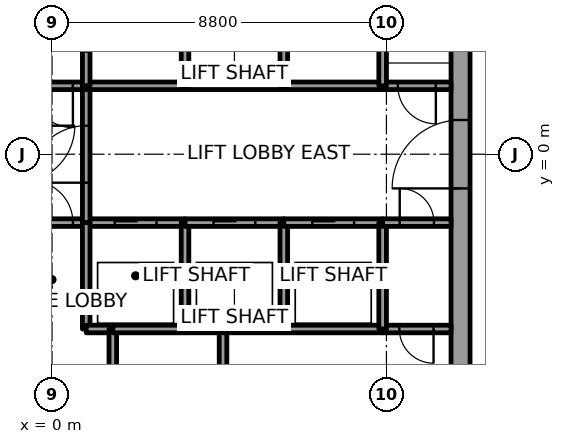
"""IFC4 building model, lengths in metres.
Left out: names, types, materials, properties, quantities, classifications, styles, units other than length and angle.
Written with IfcOpenShell. Run it as: python <this file> out.ifc"""

import sys

from ifc_helpers import new_model, si_unit, direction, frame, frame_2d, origin, place, context, subcontext, project, spatial, rectangle, extrude, element, fill, save


model = new_model("IFC4")
c1 = context("Model", 3, precision=1e-05, world=origin(), true_north=direction((0.0, 1.0)))
c2 = subcontext(c1, "Body", "Model", "MODEL_VIEW")
j1 = project(units=[si_unit("LENGTHUNIT", "METRE"), si_unit("PLANEANGLEUNIT", "RADIAN")], contexts=[c1])
p1 = place(None, origin())
s1 = spatial("IfcSite", under=j1, at=p1, CompositionType="ELEMENT")
p2 = place(p1, origin())
s2 = spatial("IfcBuilding", under=s1, at=p2, CompositionType="ELEMENT")
p3 = place(p2, frame((0.0, 0.0, 193.8)))
s3 = spatial("IfcBuildingStorey", under=s2, at=p3, CompositionType="ELEMENT", Elevation=193.8)
p4 = place(p3, frame((10.75, -7.5, 0.0), z_axis=(0.0, 0.0, 1.0), x_axis=(0.0, 1.0, 0.0)))
e1 = element("IfcWall", 1, at=p4, inside=s3, PredefinedType="SHEAR", context=c2, shape_type="SweptSolid", body=[
    extrude(rectangle(XDim=15.0, YDim=0.5, at=frame_2d((7.5, 0.0))), origin(), (0.0, 0.0, 1.0), 4.0),
])
p5 = place(p4, frame((6.6, 0.0, 0.0)))
e2 = element("IfcOpeningElement", 2, at=p5, cuts=e1, PredefinedType="OPENING", context=c2, shape_type="SweptSolid", body=[
    extrude(rectangle(XDim=1.8, YDim=2.1, at=frame_2d((0.9, 1.05))), frame((0.0, 0.25, 0.0), z_axis=(0.0, -1.0, 0.0), x_axis=(1.0, 0.0, 0.0)), (0.0, 0.0, 1.0), 0.5),
])
p6 = place(p3, frame((-0.9, -1.8, 0.0), z_axis=(0.0, 0.0, 1.0), x_axis=(1.0, 0.0, 0.0)))
e3 = element("IfcWall", 3, at=p6, inside=s3, PredefinedType="SOLIDWALL", context=c2, shape_type="SweptSolid", body=[
    extrude(rectangle(XDim=1.8, YDim=0.2, at=frame_2d((0.9, 0.0))), origin(), (0.0, 0.0, 1.0), 3.85),
])
p7 = place(p6, frame((0.35, 0.0, 0.0)))
e4 = element("IfcOpeningElement", 4, at=p7, cuts=e3, PredefinedType="OPENING", context=c2, shape_type="SweptSolid", body=[
    extrude(rectangle(XDim=1.1, YDim=2.1, at=frame_2d((0.55, 1.05))), frame((0.0, 0.1, 0.0), z_axis=(0.0, -1.0, 0.0), x_axis=(1.0, 0.0, 0.0)), (0.0, 0.0, 1.0), 0.2),
])
p8 = place(p3, frame((0.9, 1.8, 0.0), z_axis=(0.0, 0.0, 1.0), x_axis=(-1.0, 0.0, 0.0)))
e5 = element("IfcWall", 5, at=p8, inside=s3, PredefinedType="SOLIDWALL", context=c2, shape_type="SweptSolid", body=[
    extrude(rectangle(XDim=1.8, YDim=0.2, at=frame_2d((0.9, 0.0))), origin(), (0.0, 0.0, 1.0), 3.85),
])
p9 = place(p8, frame((0.35, 0.0, 0.0)))
e6 = element("IfcOpeningElement", 6, at=p9, cuts=e5, PredefinedType="OPENING", context=c2, shape_type="SweptSolid", body=[
    extrude(rectangle(XDim=1.1, YDim=2.1, at=frame_2d((0.55, 1.05))), frame((0.0, 0.1, 0.0), z_axis=(0.0, -1.0, 0.0), x_axis=(1.0, 0.0, 0.0)), (0.0, 0.0, 1.0), 0.2),
])
p10 = place(p3, frame((0.9, -1.8, 0.0), z_axis=(0.0, 0.0, 1.0), x_axis=(1.0, 0.0, 0.0)))
e7 = element("IfcWall", 7, at=p10, inside=s3, PredefinedType="SOLIDWALL", context=c2, shape_type="SweptSolid", body=[
    extrude(rectangle(XDim=2.6, YDim=0.2, at=frame_2d((1.3, 0.0))), origin(), (0.0, 0.0, 1.0), 3.85),
])
p11 = place(p10, frame((0.75, 0.0, 0.0)))
e8 = element("IfcOpeningElement", 8, at=p11, cuts=e7, PredefinedType="OPENING", context=c2, shape_type="SweptSolid", body=[
    extrude(rectangle(XDim=1.1, YDim=2.1, at=frame_2d((0.55, 1.05))), frame((0.0, 0.1, 0.0), z_axis=(0.0, -1.0, 0.0), x_axis=(1.0, 0.0, 0.0)), (0.0, 0.0, 1.0), 0.2),
])
p12 = place(p3, frame((0.9, -1.8, 0.0), z_axis=(0.0, 0.0, 1.0), x_axis=(0.0, 1.0, 0.0)))
e9 = element("IfcWall", 9, at=p12, inside=s3, PredefinedType="SOLIDWALL", context=c2, shape_type="SweptSolid", body=[
    extrude(rectangle(XDim=3.6, YDim=0.2, at=frame_2d((1.8, 0.0))), origin(), (0.0, 0.0, 1.0), 3.85),
])
p13 = place(p12, frame((1.05, 0.0, 0.0)))
e10 = element("IfcOpeningElement", 10, at=p13, cuts=e9, PredefinedType="OPENING", context=c2, shape_type="SweptSolid", body=[
    extrude(rectangle(XDim=1.5, YDim=2.1, at=frame_2d((0.75, 1.05))), frame((0.0, 0.1, 0.0), z_axis=(0.0, -1.0, 0.0), x_axis=(1.0, 0.0, 0.0)), (0.0, 0.0, 1.0), 0.2),
])
p14 = place(p3, frame((0.9, -1.8, 0.0), z_axis=(0.0, 0.0, 1.0), x_axis=(0.0, -1.0, 0.0)))
e11 = element("IfcWall", 11, at=p14, inside=s3, PredefinedType="SOLIDWALL", context=c2, shape_type="SweptSolid", body=[
    extrude(rectangle(XDim=2.8, YDim=0.2, at=frame_2d((1.4, 0.0))), origin(), (0.0, 0.0, 1.0), 3.85),
])
p15 = place(p3, frame((0.9, -4.6, 0.0), z_axis=(0.0, 0.0, 1.0), x_axis=(1.0, 0.0, 0.0)))
e12 = element("IfcWall", 12, at=p15, inside=s3, PredefinedType="SOLIDWALL", context=c2, shape_type="SweptSolid", body=[
    extrude(rectangle(XDim=0.7, YDim=0.2, at=frame_2d((0.35, 0.0))), origin(), (0.0, 0.0, 1.0), 3.85),
])
p16 = place(p3, frame((3.5, 1.8, 0.0), z_axis=(0.0, 0.0, 1.0), x_axis=(-1.0, 0.0, 0.0)))
e13 = element("IfcWall", 13, at=p16, inside=s3, PredefinedType="SOLIDWALL", context=c2, shape_type="SweptSolid", body=[
    extrude(rectangle(XDim=2.6, YDim=0.2, at=frame_2d((1.3, 0.0))), origin(), (0.0, 0.0, 1.0), 3.85),
])
p17 = place(p3, frame((0.9, 4.8, 0.0), z_axis=(0.0, 0.0, 1.0), x_axis=(0.0, -1.0, 0.0)))
e14 = element("IfcWall", 14, at=p17, inside=s3, PredefinedType="SOLIDWALL", context=c2, shape_type="SweptSolid", body=[
    extrude(rectangle(XDim=3.0, YDim=0.2, at=frame_2d((1.5, 0.0))), origin(), (0.0, 0.0, 1.0), 3.85),
])
p18 = place(p17, frame((0.9, 0.0, 0.0)))
e15 = element("IfcOpeningElement", 15, at=p18, cuts=e14, PredefinedType="OPENING", context=c2, shape_type="SweptSolid", body=[
    extrude(rectangle(XDim=1.2, YDim=2.1, at=frame_2d((0.6, 1.05))), frame((0.0, 0.1, 0.0), z_axis=(0.0, -1.0, 0.0), x_axis=(1.0, 0.0, 0.0)), (0.0, 0.0, 1.0), 0.2),
])
p19 = place(p3, frame((1.6, -4.6, 0.0), z_axis=(0.0, 0.0, 1.0), x_axis=(0.0, -1.0, 0.0)))
e16 = element("IfcWall", 16, at=p19, inside=s3, PredefinedType="SOLIDWALL", context=c2, shape_type="SweptSolid", body=[
    extrude(rectangle(XDim=2.9, YDim=0.2, at=frame_2d((1.45, 0.0))), origin(), (0.0, 0.0, 1.0), 3.85),
])
p20 = place(p19, frame((1.0, 0.0, 0.0)))
e17 = element("IfcOpeningElement", 17, at=p20, cuts=e16, PredefinedType="OPENING", context=c2, shape_type="SweptSolid", body=[
    extrude(rectangle(XDim=0.9, YDim=2.1, at=frame_2d((0.45, 1.05))), frame((0.0, 0.1, 0.0), z_axis=(0.0, -1.0, 0.0), x_axis=(1.0, 0.0, 0.0)), (0.0, 0.0, 1.0), 0.2),
])
p21 = place(p3, frame((3.5, -4.6, 0.0), z_axis=(0.0, 0.0, 1.0), x_axis=(-1.0, 0.0, 0.0)))
e18 = element("IfcWall", 18, at=p21, inside=s3, PredefinedType="SOLIDWALL", context=c2, shape_type="SweptSolid", body=[
    extrude(rectangle(XDim=1.9, YDim=0.2, at=frame_2d((0.95, 0.0))), origin(), (0.0, 0.0, 1.0), 3.85),
])
p22 = place(p3, frame((4.5, -4.6, 0.0), z_axis=(0.0, 0.0, 1.0), x_axis=(-1.0, 0.0, 0.0)))
e19 = element("IfcWall", 19, at=p22, inside=s3, PredefinedType="SOLIDWALL", context=c2, shape_type="SweptSolid", body=[
    extrude(rectangle(XDim=1.0, YDim=0.2, at=frame_2d((0.5, 0.0))), origin(), (0.0, 0.0, 1.0), 3.85),
])
p23 = place(p3, frame((3.5, -4.6, 0.0), z_axis=(0.0, 0.0, 1.0), x_axis=(0.0, 1.0, 0.0)))
e20 = element("IfcWall", 20, at=p23, inside=s3, PredefinedType="SOLIDWALL", context=c2, shape_type="SweptSolid", body=[
    extrude(rectangle(XDim=2.8, YDim=0.2, at=frame_2d((1.4, 0.0))), origin(), (0.0, 0.0, 1.0), 3.85),
])
p24 = place(p3, frame((3.5, -1.8, 0.0), z_axis=(0.0, 0.0, 1.0), x_axis=(1.0, 0.0, 0.0)))
e21 = element("IfcWall", 21, at=p24, inside=s3, PredefinedType="SOLIDWALL", context=c2, shape_type="SweptSolid", body=[
    extrude(rectangle(XDim=2.6, YDim=0.2, at=frame_2d((1.3, 0.0))), origin(), (0.0, 0.0, 1.0), 3.85),
])
p25 = place(p24, frame((0.75, 0.0, 0.0)))
e22 = element("IfcOpeningElement", 22, at=p25, cuts=e21, PredefinedType="OPENING", context=c2, shape_type="SweptSolid", body=[
    extrude(rectangle(XDim=1.1, YDim=2.1, at=frame_2d((0.55, 1.05))), frame((0.0, 0.1, 0.0), z_axis=(0.0, -1.0, 0.0), x_axis=(1.0, 0.0, 0.0)), (0.0, 0.0, 1.0), 0.2),
])
p26 = place(p3, frame((6.1, 1.8, 0.0), z_axis=(0.0, 0.0, 1.0), x_axis=(-1.0, 0.0, 0.0)))
e23 = element("IfcWall", 23, at=p26, inside=s3, PredefinedType="SOLIDWALL", context=c2, shape_type="SweptSolid", body=[
    extrude(rectangle(XDim=2.6, YDim=0.2, at=frame_2d((1.3, 0.0))), origin(), (0.0, 0.0, 1.0), 3.85),
])
p27 = place(p3, frame((3.5, 1.8, 0.0), z_axis=(0.0, 0.0, 1.0), x_axis=(0.0, 1.0, 0.0)))
e24 = element("IfcWall", 24, at=p27, inside=s3, PredefinedType="SOLIDWALL", context=c2, shape_type="SweptSolid", body=[
    extrude(rectangle(XDim=2.8, YDim=0.2, at=frame_2d((1.4, 0.0))), origin(), (0.0, 0.0, 1.0), 3.85),
])
p28 = place(p3, frame((4.5, -4.6, 0.0), z_axis=(0.0, 0.0, 1.0), x_axis=(0.0, -1.0, 0.0)))
e25 = element("IfcWall", 25, at=p28, inside=s3, PredefinedType="SOLIDWALL", context=c2, shape_type="SweptSolid", body=[
    extrude(rectangle(XDim=2.9, YDim=0.2, at=frame_2d((1.45, 0.0))), origin(), (0.0, 0.0, 1.0), 3.85),
])
p29 = place(p3, frame((6.1, -4.6, 0.0), z_axis=(0.0, 0.0, 1.0), x_axis=(-1.0, 0.0, 0.0)))
e26 = element("IfcWall", 26, at=p29, inside=s3, PredefinedType="SOLIDWALL", context=c2, shape_type="SweptSolid", body=[
    extrude(rectangle(XDim=1.6, YDim=0.2, at=frame_2d((0.8, 0.0))), origin(), (0.0, 0.0, 1.0), 3.85),
])
p30 = place(p3, frame((8.7, -4.6, 0.0), z_axis=(0.0, 0.0, 1.0), x_axis=(-1.0, 0.0, 0.0)))
e27 = element("IfcWall", 27, at=p30, inside=s3, PredefinedType="SOLIDWALL", context=c2, shape_type="SweptSolid", body=[
    extrude(rectangle(XDim=2.6, YDim=0.2, at=frame_2d((1.3, 0.0))), origin(), (0.0, 0.0, 1.0), 3.85),
])
p31 = place(p3, frame((6.1, -4.6, 0.0), z_axis=(0.0, 0.0, 1.0), x_axis=(0.0, 1.0, 0.0)))
e28 = element("IfcWall", 28, at=p31, inside=s3, PredefinedType="SOLIDWALL", context=c2, shape_type="SweptSolid", body=[
    extrude(rectangle(XDim=2.8, YDim=0.2, at=frame_2d((1.4, 0.0))), origin(), (0.0, 0.0, 1.0), 3.85),
])
p32 = place(p3, frame((6.1, -1.8, 0.0), z_axis=(0.0, 0.0, 1.0), x_axis=(1.0, 0.0, 0.0)))
e29 = element("IfcWall", 29, at=p32, inside=s3, PredefinedType="SOLIDWALL", context=c2, shape_type="SweptSolid", body=[
    extrude(rectangle(XDim=2.6, YDim=0.2, at=frame_2d((1.3, 0.0))), origin(), (0.0, 0.0, 1.0), 3.85),
])
p33 = place(p32, frame((0.75, 0.0, 0.0)))
e30 = element("IfcOpeningElement", 30, at=p33, cuts=e29, PredefinedType="OPENING", context=c2, shape_type="SweptSolid", body=[
    extrude(rectangle(XDim=1.1, YDim=2.1, at=frame_2d((0.55, 1.05))), frame((0.0, 0.1, 0.0), z_axis=(0.0, -1.0, 0.0), x_axis=(1.0, 0.0, 0.0)), (0.0, 0.0, 1.0), 0.2),
])
p34 = place(p3, frame((8.7, 1.8, 0.0), z_axis=(0.0, 0.0, 1.0), x_axis=(-1.0, 0.0, 0.0)))
e31 = element("IfcWall", 31, at=p34, inside=s3, PredefinedType="SOLIDWALL", context=c2, shape_type="SweptSolid", body=[
    extrude(rectangle(XDim=2.6, YDim=0.2, at=frame_2d((1.3, 0.0))), origin(), (0.0, 0.0, 1.0), 3.85),
])
p35 = place(p3, frame((6.1, 1.8, 0.0), z_axis=(0.0, 0.0, 1.0), x_axis=(0.0, 1.0, 0.0)))
e32 = element("IfcWall", 32, at=p35, inside=s3, PredefinedType="SOLIDWALL", context=c2, shape_type="SweptSolid", body=[
    extrude(rectangle(XDim=2.8, YDim=0.2, at=frame_2d((1.4, 0.0))), origin(), (0.0, 0.0, 1.0), 3.85),
])
p36 = place(p3, frame((10.5, -4.6, 0.0), z_axis=(0.0, 0.0, 1.0), x_axis=(-1.0, 0.0, 0.0)))
e33 = element("IfcWall", 33, at=p36, inside=s3, PredefinedType="SOLIDWALL", context=c2, shape_type="SweptSolid", body=[
    extrude(rectangle(XDim=1.8, YDim=0.2, at=frame_2d((0.9, 0.0))), origin(), (0.0, 0.0, 1.0), 3.85),
])
p37 = place(p36, frame((0.46, 0.0, 0.0)))
e34 = element("IfcOpeningElement", 34, at=p37, cuts=e33, PredefinedType="OPENING", context=c2, shape_type="SweptSolid", body=[
    extrude(rectangle(XDim=0.9, YDim=2.1, at=frame_2d((0.45, 1.05))), frame((0.0, 0.1, 0.0), z_axis=(0.0, -1.0, 0.0), x_axis=(1.0, 0.0, 0.0)), (0.0, 0.0, 1.0), 0.2),
])
p38 = place(p3, frame((8.7, -1.8, 0.0), z_axis=(0.0, 0.0, 1.0), x_axis=(0.0, -1.0, 0.0)))
e35 = element("IfcWall", 35, at=p38, inside=s3, PredefinedType="SOLIDWALL", context=c2, shape_type="SweptSolid", body=[
    extrude(rectangle(XDim=2.8, YDim=0.2, at=frame_2d((1.4, 0.0))), origin(), (0.0, 0.0, 1.0), 3.85),
])
p39 = place(p3, frame((8.7, -1.8, 0.0), z_axis=(0.0, 0.0, 1.0), x_axis=(1.0, 0.0, 0.0)))
e36 = element("IfcWall", 36, at=p39, inside=s3, PredefinedType="SOLIDWALL", context=c2, shape_type="SweptSolid", body=[
    extrude(rectangle(XDim=1.8, YDim=0.2, at=frame_2d((0.9, 0.0))), origin(), (0.0, 0.0, 1.0), 3.85),
])
p40 = place(p39, frame((0.45, 0.0, 0.0)))
e37 = element("IfcOpeningElement", 37, at=p40, cuts=e36, PredefinedType="OPENING", context=c2, shape_type="SweptSolid", body=[
    extrude(rectangle(XDim=0.9, YDim=2.1, at=frame_2d((0.45, 1.05))), frame((0.0, 0.1, 0.0), z_axis=(0.0, -1.0, 0.0), x_axis=(1.0, 0.0, 0.0)), (0.0, 0.0, 1.0), 0.2),
])
p41 = place(p3, frame((10.5, 1.8, 0.0), z_axis=(0.0, 0.0, 1.0), x_axis=(-1.0, 0.0, 0.0)))
e38 = element("IfcWall", 38, at=p41, inside=s3, PredefinedType="SOLIDWALL", context=c2, shape_type="SweptSolid", body=[
    extrude(rectangle(XDim=1.8, YDim=0.2, at=frame_2d((0.9, 0.0))), origin(), (0.0, 0.0, 1.0), 3.85),
])
p42 = place(p41, frame((0.4, 0.0, 0.0)))
e39 = element("IfcOpeningElement", 39, at=p42, cuts=e38, PredefinedType="OPENING", context=c2, shape_type="SweptSolid", body=[
    extrude(rectangle(XDim=1.0, YDim=2.1, at=frame_2d((0.5, 1.05))), frame((0.0, 0.1, 0.0), z_axis=(0.0, -1.0, 0.0), x_axis=(1.0, 0.0, 0.0)), (0.0, 0.0, 1.0), 0.2),
])
p43 = place(p3, frame((8.7, 4.6, 0.0), z_axis=(0.0, 0.0, 1.0), x_axis=(0.0, -1.0, 0.0)))
e40 = element("IfcWall", 40, at=p43, inside=s3, PredefinedType="SOLIDWALL", context=c2, shape_type="SweptSolid", body=[
    extrude(rectangle(XDim=2.8, YDim=0.2, at=frame_2d((1.4, 0.0))), origin(), (0.0, 0.0, 1.0), 3.85),
])
p44 = place(p11, origin())
e41 = element("IfcDoor", 41, at=p44, inside=s3, OperationType="SLIDING_TO_RIGHT", PredefinedType="DOOR", context=c2, shape_type="SweptSolid", body=[
    extrude(rectangle(XDim=1.1, YDim=2.1, at=frame_2d((0.55, 1.05))), frame((0.0, 0.025, 0.0), z_axis=(0.0, -1.0, 0.0), x_axis=(1.0, 0.0, 0.0)), (0.0, 0.0, 1.0), 0.05),
])
fill(e8, e41)
p45 = place(p25, origin())
e42 = element("IfcDoor", 42, at=p45, inside=s3, OperationType="SLIDING_TO_RIGHT", PredefinedType="DOOR", context=c2, shape_type="SweptSolid", body=[
    extrude(rectangle(XDim=1.1, YDim=2.1, at=frame_2d((0.55, 1.05))), frame((0.0, 0.025, 0.0), z_axis=(0.0, -1.0, 0.0), x_axis=(1.0, 0.0, 0.0)), (0.0, 0.0, 1.0), 0.05),
])
fill(e22, e42)
p46 = place(p33, origin())
e43 = element("IfcDoor", 43, at=p46, inside=s3, OperationType="SLIDING_TO_RIGHT", PredefinedType="DOOR", context=c2, shape_type="SweptSolid", body=[
    extrude(rectangle(XDim=1.1, YDim=2.1, at=frame_2d((0.55, 1.05))), frame((0.0, 0.025, 0.0), z_axis=(0.0, -1.0, 0.0), x_axis=(1.0, 0.0, 0.0)), (0.0, 0.0, 1.0), 0.05),
])
fill(e30, e43)
p47 = place(p13, origin())
e44 = element("IfcDoor", 44, at=p47, inside=s3, OperationType="DOUBLE_DOOR_SINGLE_SWING", PredefinedType="DOOR", context=c2, shape_type="SweptSolid", body=[
    extrude(rectangle(XDim=1.5, YDim=2.1, at=frame_2d((0.75, 1.05))), frame((0.0, 0.025, 0.0), z_axis=(0.0, -1.0, 0.0), x_axis=(1.0, 0.0, 0.0)), (0.0, 0.0, 1.0), 0.05),
])
fill(e10, e44)
p48 = place(p9, origin())
e45 = element("IfcDoor", 45, at=p48, inside=s3, OperationType="SINGLE_SWING_LEFT", PredefinedType="DOOR", context=c2, shape_type="SweptSolid", body=[
    extrude(rectangle(XDim=1.1, YDim=2.1, at=frame_2d((0.55, 1.05))), frame((0.0, 0.025, 0.0), z_axis=(0.0, -1.0, 0.0), x_axis=(1.0, 0.0, 0.0)), (0.0, 0.0, 1.0), 0.05),
])
fill(e6, e45)
p49 = place(p7, origin())
e46 = element("IfcDoor", 46, at=p49, inside=s3, OperationType="SINGLE_SWING_RIGHT", PredefinedType="DOOR", context=c2, shape_type="SweptSolid", body=[
    extrude(rectangle(XDim=1.1, YDim=2.1, at=frame_2d((0.55, 1.05))), frame((0.0, 0.025, 0.0), z_axis=(0.0, -1.0, 0.0), x_axis=(1.0, 0.0, 0.0)), (0.0, 0.0, 1.0), 0.05),
])
fill(e4, e46)
p50 = place(p42, origin())
e47 = element("IfcDoor", 47, at=p50, inside=s3, OperationType="SINGLE_SWING_RIGHT", PredefinedType="DOOR", context=c2, shape_type="SweptSolid", body=[
    extrude(rectangle(XDim=1.0, YDim=2.1, at=frame_2d((0.5, 1.05))), frame((0.0, 0.025, 0.0), z_axis=(0.0, -1.0, 0.0), x_axis=(1.0, 0.0, 0.0)), (0.0, 0.0, 1.0), 0.05),
])
fill(e39, e47)
p51 = place(p37, origin())
e48 = element("IfcDoor", 48, at=p51, inside=s3, OperationType="SINGLE_SWING_LEFT", PredefinedType="DOOR", context=c2, shape_type="SweptSolid", body=[
    extrude(rectangle(XDim=0.9, YDim=2.1, at=frame_2d((0.45, 1.05))), frame((0.0, 0.025, 0.0), z_axis=(0.0, -1.0, 0.0), x_axis=(1.0, 0.0, 0.0)), (0.0, 0.0, 1.0), 0.05),
])
fill(e34, e48)
p52 = place(p40, origin())
e49 = element("IfcDoor", 49, at=p52, inside=s3, OperationType="SINGLE_SWING_LEFT", PredefinedType="DOOR", context=c2, shape_type="SweptSolid", body=[
    extrude(rectangle(XDim=0.9, YDim=2.1, at=frame_2d((0.45, 1.05))), frame((0.0, 0.025, 0.0), z_axis=(0.0, -1.0, 0.0), x_axis=(1.0, 0.0, 0.0)), (0.0, 0.0, 1.0), 0.05),
])
fill(e37, e49)
p53 = place(p5, origin())
e50 = element("IfcDoor", 50, at=p53, inside=s3, OperationType="DOUBLE_DOOR_SINGLE_SWING", PredefinedType="DOOR", context=c2, shape_type="SweptSolid", body=[
    extrude(rectangle(XDim=1.8, YDim=2.1, at=frame_2d((0.9, 1.05))), frame((0.0, 0.025, 0.0), z_axis=(0.0, -1.0, 0.0), x_axis=(1.0, 0.0, 0.0)), (0.0, 0.0, 1.0), 0.05),
])
fill(e2, e50)
save(model, sys.argv[1])
